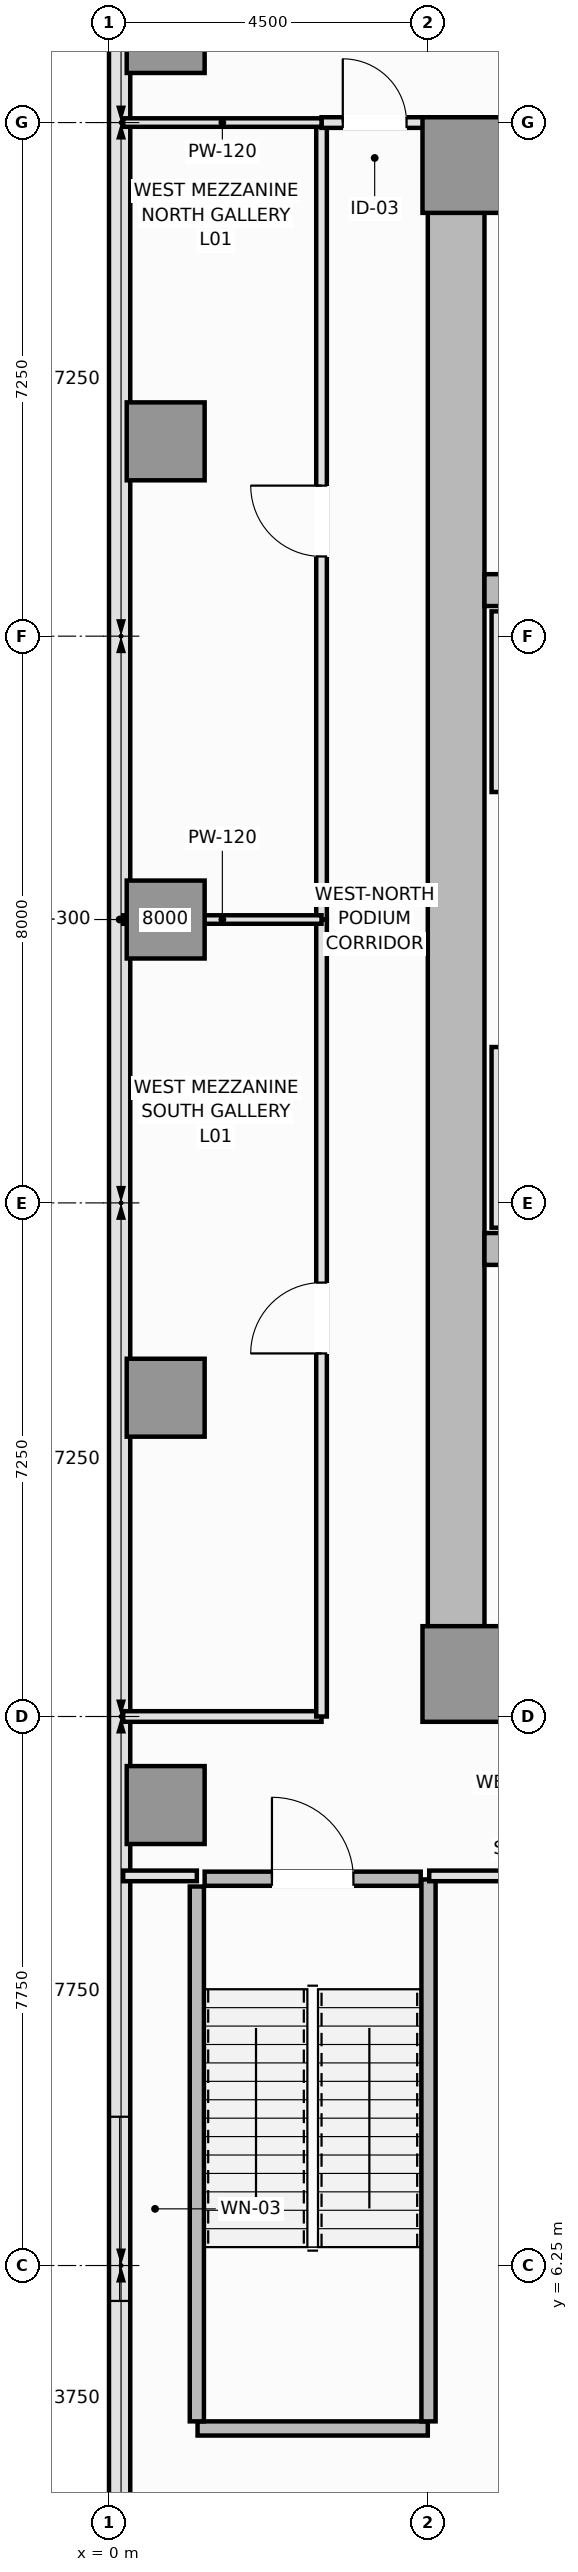
"""IFC4 building model, lengths in metres.
Left out: names, types, materials, properties, quantities, classifications, styles, units other than length and angle.
Written with IfcOpenShell. Run it as: python <this file> out.ifc"""

import sys

from ifc_helpers import new_model, si_unit, direction, frame, frame_2d, origin, origin_2d, place, context, subcontext, project, spatial, rectangle, extrude, element, fill, save


model = new_model("IFC4")
c1 = context("Model", 3, precision=1e-05, world=origin(), true_north=direction((0.0, 1.0)))
c2 = subcontext(c1, "Body", "Model", "MODEL_VIEW")
j1 = project(units=[si_unit("LENGTHUNIT", "METRE"), si_unit("PLANEANGLEUNIT", "RADIAN")], contexts=[c1])
p1 = place(None, origin())
s1 = spatial("IfcSite", under=j1, at=p1, CompositionType="ELEMENT")
p2 = place(p1, origin())
s2 = spatial("IfcBuilding", under=s1, at=p2, CompositionType="ELEMENT")
p3 = place(p2, frame((0.0, 0.0, 6.0)))
s3 = spatial("IfcBuildingStorey", under=s2, at=p3, CompositionType="ELEMENT", Elevation=6.0)
for number, where, z_axis, x_axis in (
    (1, (4.5, 14.4, 0.0), (0.0, 0.0, 1.0), (1.0, 0.0, 0.0)),
    (2, (4.5, 36.1, 0.0), (0.0, 0.0, 1.0), (1.0, 0.0, 0.0)),
):
    element("IfcWall", number, at=place(p3, frame(where, z_axis=z_axis, x_axis=x_axis)), inside=s3, PredefinedType="SHEAR", context=c2, shape_type="SweptSolid", body=[
        extrude(rectangle(XDim=13.5, YDim=0.8, at=frame_2d((6.75, 0.0))), origin(), (0.0, 0.0, 1.0), 4.8),
    ])
p4 = place(p3, frame((4.9, 14.8, 0.0), z_axis=(0.0, 0.0, 1.0), x_axis=(0.0, 1.0, 0.0)))
e3 = element("IfcWall", 3, at=p4, inside=s3, PredefinedType="SHEAR", context=c2, shape_type="SweptSolid", body=[
    extrude(rectangle(XDim=20.9, YDim=0.8, at=frame_2d((10.45, 0.0))), origin(), (0.0, 0.0, 1.0), 4.8),
])
for number, where, z_axis, x_axis in (
    (4, (5.3, 20.6, 0.0), (0.0, 0.0, 1.0), (1.0, 0.0, 0.0)),
    (5, (5.3, 29.9, 0.0), (0.0, 0.0, 1.0), (1.0, 0.0, 0.0)),
):
    element("IfcWall", number, at=place(p3, frame(where, z_axis=z_axis, x_axis=x_axis)), inside=s3, PredefinedType="SHEAR", context=c2, shape_type="SweptSolid", body=[
        extrude(rectangle(XDim=11.9, YDim=0.45, at=frame_2d((5.95, 0.0))), origin(), (0.0, 0.0, 1.0), 4.8),
    ])
for number, where, z_axis, x_axis in (
    (6, (5.1, 14.6, 0.0), (0.0, 0.0, 1.0), (1.0, 0.0, 0.0)),
    (7, (5.1, 35.9, 0.0), (0.0, 0.0, 1.0), (1.0, 0.0, 0.0)),
):
    element("IfcColumn", number, at=place(p3, frame(where, z_axis=z_axis, x_axis=x_axis)), inside=s3, PredefinedType="PILASTER", context=c2, shape_type="SweptSolid", body=[
        extrude(rectangle(XDim=1.35, YDim=1.35, at=origin_2d()), origin(), (0.0, 0.0, 1.0), 4.8),
    ])
for number, where, z_axis, x_axis in (
    (8, (0.8, 12.75, 0.0), (0.0, 0.0, 1.0), (1.0, 0.0, 0.0)),
    (9, (0.8, 18.5, 0.0), (0.0, 0.0, 1.0), (1.0, 0.0, 0.0)),
    (10, (0.8, 25.25, 0.0), (0.0, 0.0, 1.0), (1.0, 0.0, 0.0)),
    (11, (0.8, 32.0, 0.0), (0.0, 0.0, 1.0), (1.0, 0.0, 0.0)),
    (12, (0.8, 37.75, 0.0), (0.0, 0.0, 1.0), (1.0, 0.0, 0.0)),
):
    element("IfcColumn", number, at=place(p3, frame(where, z_axis=z_axis, x_axis=x_axis)), inside=s3, PredefinedType="COLUMN", context=c2, shape_type="SweptSolid", body=[
        extrude(rectangle(XDim=1.1, YDim=1.1, at=origin_2d()), origin(), (0.0, 0.0, 1.0), 4.8),
    ])
p5 = place(p3, frame((0.15, 50.35, 0.0), z_axis=(0.0, 0.0, 1.0), x_axis=(0.0, -1.0, 0.0)))
e13 = element("IfcWall", 13, at=p5, inside=s3, PredefinedType="SOLIDWALL", context=c2, shape_type="SweptSolid", body=[
    extrude(rectangle(XDim=50.2, YDim=0.3, at=frame_2d((25.1, 0.0))), origin(), (0.0, 0.0, 1.0), 4.6),
])
p6 = place(p5, frame((6.5, 0.0, 0.9)))
e14 = element("IfcOpeningElement", 14, at=p6, cuts=e13, PredefinedType="OPENING", context=c2, shape_type="SweptSolid", body=[
    extrude(rectangle(XDim=2.6, YDim=2.2, at=frame_2d((1.3, 1.1))), frame((0.0, 0.16, 0.0), z_axis=(0.0, -1.0, 0.0), x_axis=(1.0, 0.0, 0.0)), (0.0, 0.0, 1.0), 0.32),
])
p7 = place(p5, frame((42.0, 0.0, 0.9)))
e15 = element("IfcOpeningElement", 15, at=p7, cuts=e13, PredefinedType="OPENING", context=c2, shape_type="SweptSolid", body=[
    extrude(rectangle(XDim=2.6, YDim=2.2, at=frame_2d((1.3, 1.1))), frame((0.0, 0.16, 0.0), z_axis=(0.0, -1.0, 0.0), x_axis=(1.0, 0.0, 0.0)), (0.0, 0.0, 1.0), 0.32),
])
p8 = place(p3, frame((1.25, 3.95, 0.0), z_axis=(0.0, 0.0, 1.0), x_axis=(1.0, 0.0, 0.0)))
e16 = element("IfcWall", 16, at=p8, inside=s3, PredefinedType="SOLIDWALL", context=c2, shape_type="SweptSolid", body=[
    extrude(rectangle(XDim=3.25, YDim=0.2, at=frame_2d((1.625, 0.0))), origin(), (0.0, 0.0, 1.0), 4.8),
])
p9 = place(p3, frame((1.24, 4.05, 0.0), z_axis=(0.0, 0.0, 1.0), x_axis=(0.0, 1.0, 0.0)))
e17 = element("IfcWall", 17, at=p9, inside=s3, PredefinedType="SOLIDWALL", context=c2, shape_type="SweptSolid", body=[
    extrude(rectangle(XDim=7.55, YDim=0.2, at=frame_2d((3.775, 0.0))), origin(), (0.0, 0.0, 1.0), 4.8),
])
p10 = place(p3, frame((4.51, 4.05, 0.0), z_axis=(0.0, 0.0, 1.0), x_axis=(0.0, 1.0, 0.0)))
e18 = element("IfcWall", 18, at=p10, inside=s3, PredefinedType="SOLIDWALL", context=c2, shape_type="SweptSolid", body=[
    extrude(rectangle(XDim=7.65, YDim=0.2, at=frame_2d((3.825, 0.0))), origin(), (0.0, 0.0, 1.0), 4.8),
])
p11 = place(p3, frame((1.35, 11.71, 0.0), z_axis=(0.0, 0.0, 1.0), x_axis=(1.0, 0.0, 0.0)))
e19 = element("IfcWall", 19, at=p11, inside=s3, PredefinedType="SOLIDWALL", context=c2, shape_type="SweptSolid", body=[
    extrude(rectangle(XDim=3.05, YDim=0.2, at=frame_2d((1.525, 0.0))), origin(), (0.0, 0.0, 1.0), 4.8),
])
p12 = place(p11, frame((0.95, 0.0, 0.0)))
e20 = element("IfcOpeningElement", 20, at=p12, cuts=e19, PredefinedType="OPENING", context=c2, shape_type="SweptSolid", body=[
    extrude(rectangle(XDim=1.15, YDim=2.15, at=frame_2d((0.575, 1.075))), frame((0.0, 0.11, 0.0), z_axis=(0.0, -1.0, 0.0), x_axis=(1.0, 0.0, 0.0)), (0.0, 0.0, 1.0), 0.22),
])
for number, where, z_axis, x_axis in (
    (21, (5.475, 20.9, 0.0), (0.0, 0.0, 1.0), (0.0, 1.0, 0.0)),
    (22, (5.475, 27.05, 0.0), (0.0, 0.0, 1.0), (0.0, 1.0, 0.0)),
):
    element("IfcWall", number, at=place(p3, frame(where, z_axis=z_axis, x_axis=x_axis)), inside=s3, PredefinedType="PARTITIONING", context=c2, shape_type="SweptSolid", body=[
        extrude(rectangle(XDim=2.55, YDim=0.15, at=frame_2d((1.275, 0.0))), origin(), (0.0, 0.0, 1.0), 4.6),
    ])
p13 = place(p3, frame((0.2, 11.75, 0.0), z_axis=(0.0, 0.0, 1.0), x_axis=(1.0, 0.0, 0.0)))
e23 = element("IfcWall", 23, at=p13, inside=s3, PredefinedType="PARTITIONING", context=c2, shape_type="SweptSolid", body=[
    extrude(rectangle(XDim=1.04, YDim=0.15, at=frame_2d((0.52, 0.0))), origin(), (0.0, 0.0, 1.0), 4.6),
])
p14 = place(p3, frame((4.52, 11.75, 0.0), z_axis=(0.0, 0.0, 1.0), x_axis=(1.0, 0.0, 0.0)))
e24 = element("IfcWall", 24, at=p14, inside=s3, PredefinedType="PARTITIONING", context=c2, shape_type="SweptSolid", body=[
    extrude(rectangle(XDim=16.73, YDim=0.15, at=frame_2d((8.365, 0.0))), origin(), (0.0, 0.0, 1.0), 4.6),
])
p15 = place(p14, frame((7.94, 0.0, 0.0)))
e25 = element("IfcOpeningElement", 25, at=p15, cuts=e24, PredefinedType="OPENING", context=c2, shape_type="SweptSolid", body=[
    extrude(rectangle(XDim=1.0, YDim=2.15, at=frame_2d((0.5, 1.075))), frame((0.0, 0.085, 0.0), z_axis=(0.0, -1.0, 0.0), x_axis=(1.0, 0.0, 0.0)), (0.0, 0.0, 1.0), 0.17),
])
p16 = place(p3, frame((0.2, 14.0, 0.0), z_axis=(0.0, 0.0, 1.0), x_axis=(1.0, 0.0, 0.0)))
e26 = element("IfcWall", 26, at=p16, inside=s3, PredefinedType="PARTITIONING", context=c2, shape_type="SweptSolid", body=[
    extrude(rectangle(XDim=2.8, YDim=0.15, at=frame_2d((1.4, 0.0))), origin(), (0.0, 0.0, 1.0), 4.6),
])
p17 = place(p3, frame((3.0, 14.0, 0.0), z_axis=(0.0, 0.0, 1.0), x_axis=(0.0, 1.0, 0.0)))
e27 = element("IfcWall", 27, at=p17, inside=s3, PredefinedType="PARTITIONING", context=c2, shape_type="SweptSolid", body=[
    extrude(rectangle(XDim=11.25, YDim=0.15, at=frame_2d((5.625, 0.0))), origin(), (0.0, 0.0, 1.0), 4.6),
])
p18 = place(p17, frame((5.125, 0.0, 0.0)))
e28 = element("IfcOpeningElement", 28, at=p18, cuts=e27, PredefinedType="OPENING", context=c2, shape_type="SweptSolid", body=[
    extrude(rectangle(XDim=1.0, YDim=2.15, at=frame_2d((0.5, 1.075))), frame((0.0, 0.085, 0.0), z_axis=(0.0, -1.0, 0.0), x_axis=(1.0, 0.0, 0.0)), (0.0, 0.0, 1.0), 0.17),
])
p19 = place(p3, frame((3.0, 25.25, 0.0), z_axis=(0.0, 0.0, 1.0), x_axis=(0.0, 1.0, 0.0)))
e29 = element("IfcWall", 29, at=p19, inside=s3, PredefinedType="PARTITIONING", context=c2, shape_type="SweptSolid", body=[
    extrude(rectangle(XDim=11.25, YDim=0.15, at=frame_2d((5.625, 0.0))), origin(), (0.0, 0.0, 1.0), 4.6),
])
p20 = place(p19, frame((5.125, 0.0, 0.0)))
e30 = element("IfcOpeningElement", 30, at=p20, cuts=e29, PredefinedType="OPENING", context=c2, shape_type="SweptSolid", body=[
    extrude(rectangle(XDim=1.0, YDim=2.15, at=frame_2d((0.5, 1.075))), frame((0.0, 0.085, 0.0), z_axis=(0.0, -1.0, 0.0), x_axis=(1.0, 0.0, 0.0)), (0.0, 0.0, 1.0), 0.17),
])
p21 = place(p3, frame((3.0, 36.5, 0.0), z_axis=(0.0, 0.0, 1.0), x_axis=(1.0, 0.0, 0.0)))
e31 = element("IfcWall", 31, at=p21, inside=s3, PredefinedType="PARTITIONING", context=c2, shape_type="SweptSolid", body=[
    extrude(rectangle(XDim=1.5, YDim=0.15, at=frame_2d((0.75, 0.0))), origin(), (0.0, 0.0, 1.0), 4.6),
])
p22 = place(p21, frame((0.3, 0.0, 0.0)))
e32 = element("IfcOpeningElement", 32, at=p22, cuts=e31, PredefinedType="OPENING", context=c2, shape_type="SweptSolid", body=[
    extrude(rectangle(XDim=0.9, YDim=2.1, at=frame_2d((0.45, 1.05))), frame((0.0, 0.085, 0.0), z_axis=(0.0, -1.0, 0.0), x_axis=(1.0, 0.0, 0.0)), (0.0, 0.0, 1.0), 0.17),
])
p23 = place(p3, frame((0.2, 25.25, 0.0), z_axis=(0.0, 0.0, 1.0), x_axis=(1.0, 0.0, 0.0)))
e33 = element("IfcWall", 33, at=p23, inside=s3, PredefinedType="PARTITIONING", context=c2, shape_type="SweptSolid", body=[
    extrude(rectangle(XDim=2.8, YDim=0.12, at=frame_2d((1.4, 0.0))), origin(), (0.0, 0.0, 1.0), 3.8),
])
p24 = place(p3, frame((0.2, 36.5, 0.0), z_axis=(0.0, 0.0, 1.0), x_axis=(1.0, 0.0, 0.0)))
e34 = element("IfcWall", 34, at=p24, inside=s3, PredefinedType="PARTITIONING", context=c2, shape_type="SweptSolid", body=[
    extrude(rectangle(XDim=2.8, YDim=0.12, at=frame_2d((1.4, 0.0))), origin(), (0.0, 0.0, 1.0), 4.6),
])
p25 = place(p7, origin())
e35 = element("IfcWindow", 35, at=p25, inside=s3, PartitioningType="SINGLE_PANEL", PredefinedType="WINDOW", context=c2, shape_type="SweptSolid", body=[
    extrude(rectangle(XDim=2.6, YDim=2.2, at=frame_2d((1.3, 1.1))), frame((0.0, 0.03, 0.0), z_axis=(0.0, -1.0, 0.0), x_axis=(1.0, 0.0, 0.0)), (0.0, 0.0, 1.0), 0.06),
])
fill(e15, e35)
p26 = place(p12, origin())
e36 = element("IfcDoor", 36, at=p26, inside=s3, OperationType="SINGLE_SWING_LEFT", PredefinedType="DOOR", context=c2, shape_type="SweptSolid", body=[
    extrude(rectangle(XDim=1.15, YDim=2.15, at=frame_2d((0.575, 1.075))), frame((0.0, 0.025, 0.0), z_axis=(0.0, -1.0, 0.0), x_axis=(1.0, 0.0, 0.0)), (0.0, 0.0, 1.0), 0.05),
])
fill(e20, e36)
p27 = place(p18, origin())
e37 = element("IfcDoor", 37, at=p27, inside=s3, OperationType="SINGLE_SWING_LEFT", PredefinedType="DOOR", context=c2, shape_type="SweptSolid", body=[
    extrude(rectangle(XDim=1.0, YDim=2.15, at=frame_2d((0.5, 1.075))), frame((0.0, 0.025, 0.0), z_axis=(0.0, -1.0, 0.0), x_axis=(1.0, 0.0, 0.0)), (0.0, 0.0, 1.0), 0.05),
])
fill(e28, e37)
p28 = place(p20, origin())
e38 = element("IfcDoor", 38, at=p28, inside=s3, OperationType="SINGLE_SWING_RIGHT", PredefinedType="DOOR", context=c2, shape_type="SweptSolid", body=[
    extrude(rectangle(XDim=1.0, YDim=2.15, at=frame_2d((0.5, 1.075))), frame((0.0, 0.025, 0.0), z_axis=(0.0, -1.0, 0.0), x_axis=(1.0, 0.0, 0.0)), (0.0, 0.0, 1.0), 0.05),
])
fill(e30, e38)
p29 = place(p22, origin())
e39 = element("IfcDoor", 39, at=p29, inside=s3, OperationType="SINGLE_SWING_LEFT", PredefinedType="DOOR", context=c2, shape_type="SweptSolid", body=[
    extrude(rectangle(XDim=0.9, YDim=2.1, at=frame_2d((0.45, 1.05))), frame((0.0, 0.025, 0.0), z_axis=(0.0, -1.0, 0.0), x_axis=(1.0, 0.0, 0.0)), (0.0, 0.0, 1.0), 0.05),
])
fill(e32, e39)
save(model, sys.argv[1])
